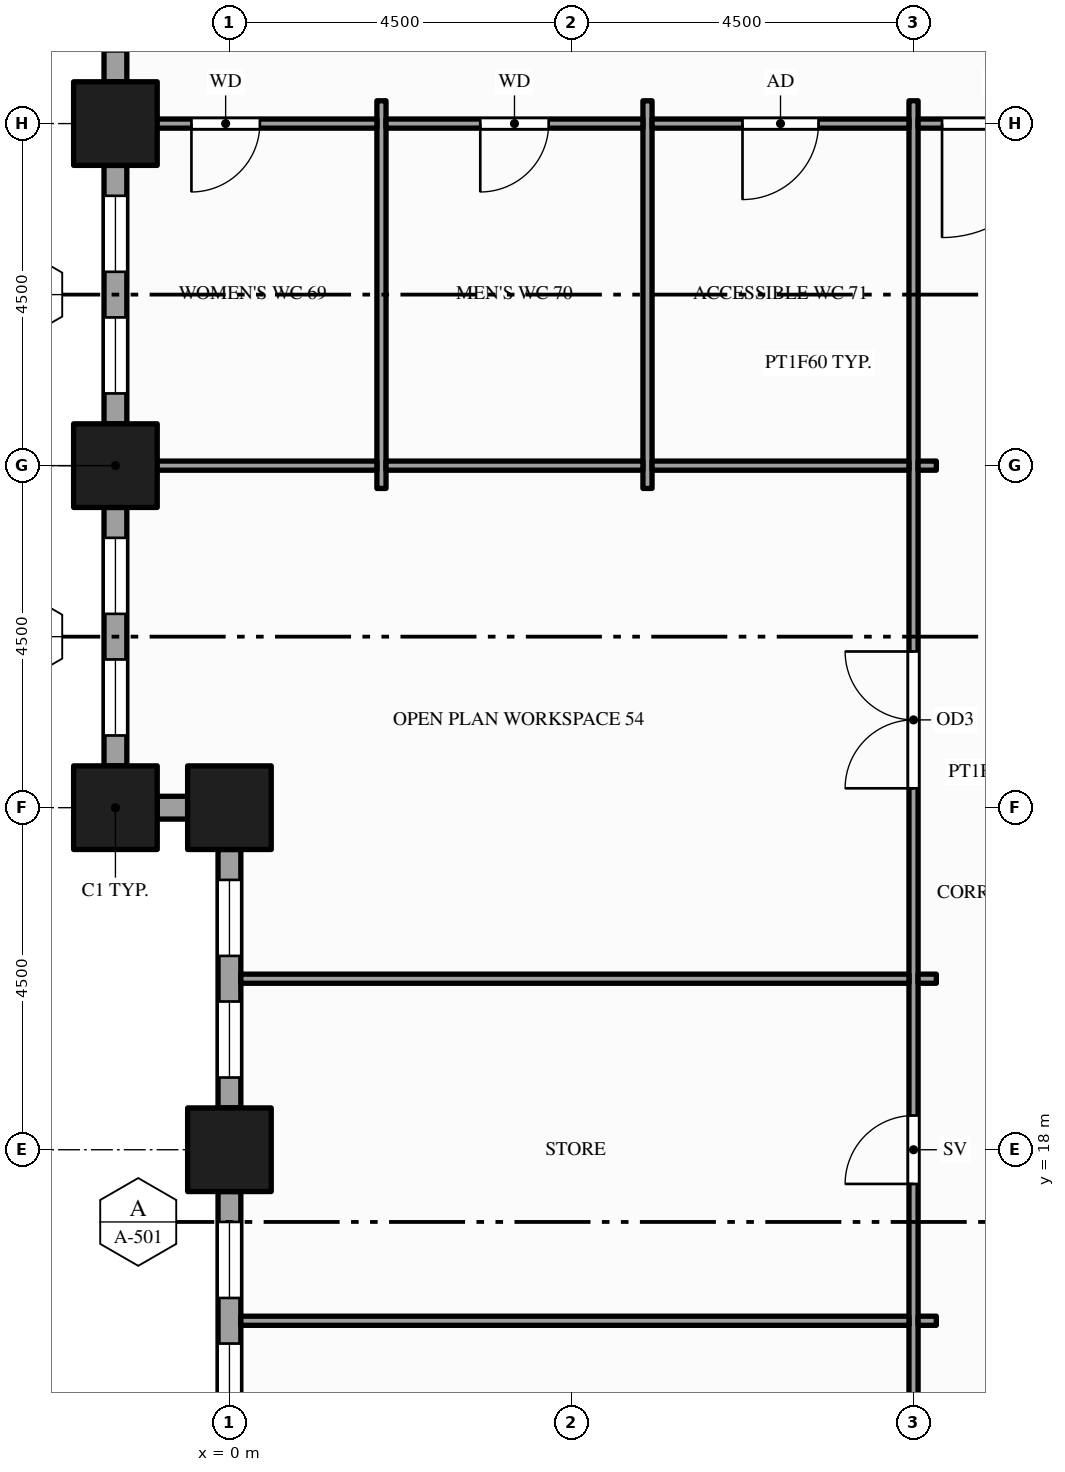
"""IFC4 building model, lengths in metres.
Left out: names, types, materials, properties, quantities, classifications, styles, units other than length and angle.
Written with IfcOpenShell. Run it as: python <this file> out.ifc"""

import sys

from ifc_helpers import new_model, si_unit, direction, frame, frame_2d, origin, origin_2d, place, context, subcontext, project, spatial, rectangle, hollow_rectangle, extrude, element, fill, save


model = new_model("IFC4")
c1 = context("Model", 3, precision=1e-05, world=origin(), true_north=direction((0.0, 1.0)))
c2 = subcontext(c1, "Body", "Model", "MODEL_VIEW")
j1 = project(units=[si_unit("LENGTHUNIT", "METRE"), si_unit("PLANEANGLEUNIT", "RADIAN")], contexts=[c1])
p1 = place(None, origin())
s1 = spatial("IfcSite", under=j1, at=p1, CompositionType="ELEMENT")
p2 = place(p1, origin())
s2 = spatial("IfcBuilding", under=s1, at=p2, CompositionType="ELEMENT")
p3 = place(p2, frame((0.0, 0.0, 29.0)))
s3 = spatial("IfcBuildingStorey", under=s2, at=p3, CompositionType="ELEMENT", Elevation=29.0)
for number, where, z_axis, x_axis in (
    (1, (-1.5, 22.5, -0.15), (0.0, 0.0, 1.0), (1.0, 0.0, 0.0)),
    (2, (-1.5, 27.0, -0.15), (0.0, 0.0, 1.0), (1.0, 0.0, 0.0)),
    (3, (-1.5, 31.5, -0.15), (0.0, 0.0, 1.0), (1.0, 0.0, 0.0)),
    (4, (0.0, 18.0, -0.15), (0.0, 0.0, 1.0), (1.0, 0.0, 0.0)),
    (5, (0.0, 22.5, -0.15), (0.0, 0.0, 1.0), (1.0, 0.0, 0.0)),
):
    element("IfcColumn", number, at=place(p3, frame(where, z_axis=z_axis, x_axis=x_axis)), inside=s3, PredefinedType="COLUMN", context=c2, shape_type="SweptSolid", body=[
        extrude(hollow_rectangle(XDim=1.1, YDim=1.1, WallThickness=0.06, at=origin_2d()), origin(), (0.0, 0.0, 1.0), 4.0),
    ])
p4 = place(p3, frame((-1.5, 35.45, 0.0), z_axis=(0.0, 0.0, 1.0), x_axis=(0.0, -1.0, 0.0)))
e6 = element("IfcWall", 6, at=p4, inside=s3, PredefinedType="STANDARD", context=c2, shape_type="SweptSolid", body=[
    extrude(rectangle(XDim=3.4, YDim=0.3, at=frame_2d((1.7, 0.0))), origin(), (0.0, 0.0, 1.0), 3.144),
])
p5 = place(p4, frame((0.4, 0.0, 0.9)))
e7 = element("IfcOpeningElement", 7, at=p5, cuts=e6, PredefinedType="OPENING", context=c2, shape_type="SweptSolid", body=[
    extrude(rectangle(XDim=1.0, YDim=2.0, at=frame_2d((0.5, 1.0))), frame((0.0, 0.16, 0.0), z_axis=(0.0, -1.0, 0.0), x_axis=(1.0, 0.0, 0.0)), (0.0, 0.0, 1.0), 0.32),
])
p6 = place(p4, frame((2.0, 0.0, 0.9)))
e8 = element("IfcOpeningElement", 8, at=p6, cuts=e6, PredefinedType="OPENING", context=c2, shape_type="SweptSolid", body=[
    extrude(rectangle(XDim=1.0, YDim=2.0, at=frame_2d((0.5, 1.0))), frame((0.0, 0.16, 0.0), z_axis=(0.0, -1.0, 0.0), x_axis=(1.0, 0.0, 0.0)), (0.0, 0.0, 1.0), 0.32),
])
p7 = place(p3, frame((-1.5, 30.95, 0.0), z_axis=(0.0, 0.0, 1.0), x_axis=(0.0, -1.0, 0.0)))
e9 = element("IfcWall", 9, at=p7, inside=s3, PredefinedType="STANDARD", context=c2, shape_type="SweptSolid", body=[
    extrude(rectangle(XDim=3.4, YDim=0.3, at=frame_2d((1.7, 0.0))), origin(), (0.0, 0.0, 1.0), 3.144),
])
p8 = place(p7, frame((0.4, 0.0, 0.9)))
e10 = element("IfcOpeningElement", 10, at=p8, cuts=e9, PredefinedType="OPENING", context=c2, shape_type="SweptSolid", body=[
    extrude(rectangle(XDim=1.0, YDim=2.0, at=frame_2d((0.5, 1.0))), frame((0.0, 0.16, 0.0), z_axis=(0.0, -1.0, 0.0), x_axis=(1.0, 0.0, 0.0)), (0.0, 0.0, 1.0), 0.32),
])
p9 = place(p7, frame((2.0, 0.0, 0.9)))
e11 = element("IfcOpeningElement", 11, at=p9, cuts=e9, PredefinedType="OPENING", context=c2, shape_type="SweptSolid", body=[
    extrude(rectangle(XDim=1.0, YDim=2.0, at=frame_2d((0.5, 1.0))), frame((0.0, 0.16, 0.0), z_axis=(0.0, -1.0, 0.0), x_axis=(1.0, 0.0, 0.0)), (0.0, 0.0, 1.0), 0.32),
])
p10 = place(p3, frame((-1.5, 26.45, 0.0), z_axis=(0.0, 0.0, 1.0), x_axis=(0.0, -1.0, 0.0)))
e12 = element("IfcWall", 12, at=p10, inside=s3, PredefinedType="STANDARD", context=c2, shape_type="SweptSolid", body=[
    extrude(rectangle(XDim=3.4, YDim=0.3, at=frame_2d((1.7, 0.0))), origin(), (0.0, 0.0, 1.0), 3.144),
])
p11 = place(p10, frame((0.4, 0.0, 0.9)))
e13 = element("IfcOpeningElement", 13, at=p11, cuts=e12, PredefinedType="OPENING", context=c2, shape_type="SweptSolid", body=[
    extrude(rectangle(XDim=1.0, YDim=2.0, at=frame_2d((0.5, 1.0))), frame((0.0, 0.16, 0.0), z_axis=(0.0, -1.0, 0.0), x_axis=(1.0, 0.0, 0.0)), (0.0, 0.0, 1.0), 0.32),
])
p12 = place(p10, frame((2.0, 0.0, 0.9)))
e14 = element("IfcOpeningElement", 14, at=p12, cuts=e12, PredefinedType="OPENING", context=c2, shape_type="SweptSolid", body=[
    extrude(rectangle(XDim=1.0, YDim=2.0, at=frame_2d((0.5, 1.0))), frame((0.0, 0.16, 0.0), z_axis=(0.0, -1.0, 0.0), x_axis=(1.0, 0.0, 0.0)), (0.0, 0.0, 1.0), 0.32),
])
p13 = place(p3, frame((-0.95, 22.5, 0.0), z_axis=(0.0, 0.0, 1.0), x_axis=(1.0, 0.0, 0.0)))
e15 = element("IfcWall", 15, at=p13, inside=s3, PredefinedType="STANDARD", context=c2, shape_type="SweptSolid", body=[
    extrude(rectangle(XDim=0.4, YDim=0.3, at=frame_2d((0.2, 0.0))), origin(), (0.0, 0.0, 1.0), 3.144),
])
p14 = place(p3, frame((0.0, 21.95, 0.0), z_axis=(0.0, 0.0, 1.0), x_axis=(0.0, -1.0, 0.0)))
e16 = element("IfcWall", 16, at=p14, inside=s3, PredefinedType="STANDARD", context=c2, shape_type="SweptSolid", body=[
    extrude(rectangle(XDim=3.4, YDim=0.3, at=frame_2d((1.7, 0.0))), origin(), (0.0, 0.0, 1.0), 3.144),
])
p15 = place(p14, frame((0.4, 0.0, 0.9)))
e17 = element("IfcOpeningElement", 17, at=p15, cuts=e16, PredefinedType="OPENING", context=c2, shape_type="SweptSolid", body=[
    extrude(rectangle(XDim=1.0, YDim=2.0, at=frame_2d((0.5, 1.0))), frame((0.0, 0.16, 0.0), z_axis=(0.0, -1.0, 0.0), x_axis=(1.0, 0.0, 0.0)), (0.0, 0.0, 1.0), 0.32),
])
p16 = place(p14, frame((2.0, 0.0, 0.9)))
e18 = element("IfcOpeningElement", 18, at=p16, cuts=e16, PredefinedType="OPENING", context=c2, shape_type="SweptSolid", body=[
    extrude(rectangle(XDim=1.0, YDim=2.0, at=frame_2d((0.5, 1.0))), frame((0.0, 0.16, 0.0), z_axis=(0.0, -1.0, 0.0), x_axis=(1.0, 0.0, 0.0)), (0.0, 0.0, 1.0), 0.32),
])
p17 = place(p3, frame((0.0, 17.45, 0.0), z_axis=(0.0, 0.0, 1.0), x_axis=(0.0, -1.0, 0.0)))
e19 = element("IfcWall", 19, at=p17, inside=s3, PredefinedType="STANDARD", context=c2, shape_type="SweptSolid", body=[
    extrude(rectangle(XDim=3.4, YDim=0.3, at=frame_2d((1.7, 0.0))), origin(), (0.0, 0.0, 1.0), 3.144),
])
p18 = place(p17, frame((0.4, 0.0, 0.9)))
e20 = element("IfcOpeningElement", 20, at=p18, cuts=e19, PredefinedType="OPENING", context=c2, shape_type="SweptSolid", body=[
    extrude(rectangle(XDim=1.0, YDim=2.0, at=frame_2d((0.5, 1.0))), frame((0.0, 0.16, 0.0), z_axis=(0.0, -1.0, 0.0), x_axis=(1.0, 0.0, 0.0)), (0.0, 0.0, 1.0), 0.32),
])
p19 = place(p17, frame((2.0, 0.0, 0.9)))
e21 = element("IfcOpeningElement", 21, at=p19, cuts=e19, PredefinedType="OPENING", context=c2, shape_type="SweptSolid", body=[
    extrude(rectangle(XDim=1.0, YDim=2.0, at=frame_2d((0.5, 1.0))), frame((0.0, 0.16, 0.0), z_axis=(0.0, -1.0, 0.0), x_axis=(1.0, 0.0, 0.0)), (0.0, 0.0, 1.0), 0.32),
])
for number, where, z_axis, x_axis in (
    (22, (2.0, 26.7, 0.0), (0.0, 0.0, 1.0), (0.0, 1.0, 0.0)),
    (23, (5.5, 26.7, 0.0), (0.0, 0.0, 1.0), (0.0, 1.0, 0.0)),
):
    element("IfcWall", number, at=place(p3, frame(where, z_axis=z_axis, x_axis=x_axis)), inside=s3, PredefinedType="PARTITIONING", context=c2, shape_type="SweptSolid", body=[
        extrude(rectangle(XDim=5.1, YDim=0.12, at=frame_2d((2.55, 0.0))), origin(), (0.0, 0.0, 1.0), 3.85),
    ])
p20 = place(p3, frame((9.0, 10.95, 0.0), z_axis=(0.0, 0.0, 1.0), x_axis=(0.0, 1.0, 0.0)))
e24 = element("IfcWall", 24, at=p20, inside=s3, PredefinedType="PARTITIONING", context=c2, shape_type="SweptSolid", body=[
    extrude(rectangle(XDim=20.85, YDim=0.12, at=frame_2d((10.425, 0.0))), origin(), (0.0, 0.0, 1.0), 2.6),
])
p21 = place(p20, frame((2.05, 0.0, 0.0)))
e25 = element("IfcOpeningElement", 25, at=p21, cuts=e24, PredefinedType="OPENING", context=c2, shape_type="SweptSolid", body=[
    extrude(rectangle(XDim=1.0, YDim=2.1, at=frame_2d((0.5, 1.05))), frame((0.0, 0.07, 0.0), z_axis=(0.0, -1.0, 0.0), x_axis=(1.0, 0.0, 0.0)), (0.0, 0.0, 1.0), 0.14),
])
p22 = place(p20, frame((6.6, 0.0, 0.0)))
e26 = element("IfcOpeningElement", 26, at=p22, cuts=e24, PredefinedType="OPENING", context=c2, shape_type="SweptSolid", body=[
    extrude(rectangle(XDim=0.9, YDim=2.1, at=frame_2d((0.45, 1.05))), frame((0.0, 0.07, 0.0), z_axis=(0.0, -1.0, 0.0), x_axis=(1.0, 0.0, 0.0)), (0.0, 0.0, 1.0), 0.14),
])
p23 = place(p20, frame((11.805, 0.0, 0.0)))
e27 = element("IfcOpeningElement", 27, at=p23, cuts=e24, PredefinedType="OPENING", context=c2, shape_type="SweptSolid", body=[
    extrude(rectangle(XDim=1.8, YDim=2.1, at=frame_2d((0.9, 1.05))), frame((0.0, 0.07, 0.0), z_axis=(0.0, -1.0, 0.0), x_axis=(1.0, 0.0, 0.0)), (0.0, 0.0, 1.0), 0.14),
])
p24 = place(p3, frame((0.15, 15.75, 0.0), z_axis=(0.0, 0.0, 1.0), x_axis=(1.0, 0.0, 0.0)))
e28 = element("IfcWall", 28, at=p24, inside=s3, PredefinedType="PARTITIONING", context=c2, shape_type="SweptSolid", body=[
    extrude(rectangle(XDim=8.79, YDim=0.12, at=frame_2d((4.395, 0.0))), origin(), (0.0, 0.0, 1.0), 2.938),
])
p25 = place(p3, frame((9.06, 15.75, 0.0), z_axis=(0.0, 0.0, 1.0), x_axis=(1.0, 0.0, 0.0)))
e29 = element("IfcWall", 29, at=p25, inside=s3, PredefinedType="PARTITIONING", context=c2, shape_type="SweptSolid", body=[
    extrude(rectangle(XDim=0.24, YDim=0.12, at=frame_2d((0.12, 0.0))), origin(), (0.0, 0.0, 1.0), 2.938),
])
p26 = place(p3, frame((0.15, 20.25, 0.0), z_axis=(0.0, 0.0, 1.0), x_axis=(1.0, 0.0, 0.0)))
e30 = element("IfcWall", 30, at=p26, inside=s3, PredefinedType="PARTITIONING", context=c2, shape_type="SweptSolid", body=[
    extrude(rectangle(XDim=8.79, YDim=0.12, at=frame_2d((4.395, 0.0))), origin(), (0.0, 0.0, 1.0), 2.938),
])
p27 = place(p3, frame((9.06, 20.25, 0.0), z_axis=(0.0, 0.0, 1.0), x_axis=(1.0, 0.0, 0.0)))
e31 = element("IfcWall", 31, at=p27, inside=s3, PredefinedType="PARTITIONING", context=c2, shape_type="SweptSolid", body=[
    extrude(rectangle(XDim=0.24, YDim=0.12, at=frame_2d((0.12, 0.0))), origin(), (0.0, 0.0, 1.0), 2.938),
])
p28 = place(p3, frame((-1.35, 27.0, 0.0), z_axis=(0.0, 0.0, 1.0), x_axis=(1.0, 0.0, 0.0)))
e32 = element("IfcWall", 32, at=p28, inside=s3, PredefinedType="PARTITIONING", context=c2, shape_type="SweptSolid", body=[
    extrude(rectangle(XDim=3.29, YDim=0.12, at=frame_2d((1.645, 0.0))), origin(), (0.0, 0.0, 1.0), 2.938),
])
for number, where, z_axis, x_axis in (
    (33, (2.06, 27.0, 0.0), (0.0, 0.0, 1.0), (1.0, 0.0, 0.0)),
    (34, (5.56, 27.0, 0.0), (0.0, 0.0, 1.0), (1.0, 0.0, 0.0)),
):
    element("IfcWall", number, at=place(p3, frame(where, z_axis=z_axis, x_axis=x_axis)), inside=s3, PredefinedType="PARTITIONING", context=c2, shape_type="SweptSolid", body=[
        extrude(rectangle(XDim=3.38, YDim=0.12, at=frame_2d((1.69, 0.0))), origin(), (0.0, 0.0, 1.0), 2.938),
    ])
p29 = place(p3, frame((9.06, 27.0, 0.0), z_axis=(0.0, 0.0, 1.0), x_axis=(1.0, 0.0, 0.0)))
e35 = element("IfcWall", 35, at=p29, inside=s3, PredefinedType="PARTITIONING", context=c2, shape_type="SweptSolid", body=[
    extrude(rectangle(XDim=0.24, YDim=0.12, at=frame_2d((0.12, 0.0))), origin(), (0.0, 0.0, 1.0), 2.938),
])
p30 = place(p3, frame((-1.35, 31.5, 0.0), z_axis=(0.0, 0.0, 1.0), x_axis=(1.0, 0.0, 0.0)))
e36 = element("IfcWall", 36, at=p30, inside=s3, PredefinedType="PARTITIONING", context=c2, shape_type="SweptSolid", body=[
    extrude(rectangle(XDim=3.29, YDim=0.12, at=frame_2d((1.645, 0.0))), origin(), (0.0, 0.0, 1.0), 2.938),
])
p31 = place(p30, frame((0.85, 0.0, 0.0)))
e37 = element("IfcOpeningElement", 37, at=p31, cuts=e36, PredefinedType="OPENING", context=c2, shape_type="SweptSolid", body=[
    extrude(rectangle(XDim=0.9, YDim=2.1, at=frame_2d((0.45, 1.05))), frame((0.0, 0.07, 0.0), z_axis=(0.0, -1.0, 0.0), x_axis=(1.0, 0.0, 0.0)), (0.0, 0.0, 1.0), 0.14),
])
p32 = place(p3, frame((2.06, 31.5, 0.0), z_axis=(0.0, 0.0, 1.0), x_axis=(1.0, 0.0, 0.0)))
e38 = element("IfcWall", 38, at=p32, inside=s3, PredefinedType="PARTITIONING", context=c2, shape_type="SweptSolid", body=[
    extrude(rectangle(XDim=3.38, YDim=0.12, at=frame_2d((1.69, 0.0))), origin(), (0.0, 0.0, 1.0), 2.938),
])
p33 = place(p32, frame((1.24, 0.0, 0.0)))
e39 = element("IfcOpeningElement", 39, at=p33, cuts=e38, PredefinedType="OPENING", context=c2, shape_type="SweptSolid", body=[
    extrude(rectangle(XDim=0.9, YDim=2.1, at=frame_2d((0.45, 1.05))), frame((0.0, 0.07, 0.0), z_axis=(0.0, -1.0, 0.0), x_axis=(1.0, 0.0, 0.0)), (0.0, 0.0, 1.0), 0.14),
])
p34 = place(p3, frame((5.56, 31.5, 0.0), z_axis=(0.0, 0.0, 1.0), x_axis=(1.0, 0.0, 0.0)))
e40 = element("IfcWall", 40, at=p34, inside=s3, PredefinedType="PARTITIONING", context=c2, shape_type="SweptSolid", body=[
    extrude(rectangle(XDim=3.38, YDim=0.12, at=frame_2d((1.69, 0.0))), origin(), (0.0, 0.0, 1.0), 2.938),
])
p35 = place(p34, frame((1.19, 0.0, 0.0)))
e41 = element("IfcOpeningElement", 41, at=p35, cuts=e40, PredefinedType="OPENING", context=c2, shape_type="SweptSolid", body=[
    extrude(rectangle(XDim=1.0, YDim=2.1, at=frame_2d((0.5, 1.05))), frame((0.0, 0.07, 0.0), z_axis=(0.0, -1.0, 0.0), x_axis=(1.0, 0.0, 0.0)), (0.0, 0.0, 1.0), 0.14),
])
p36 = place(p3, frame((9.06, 31.5, 0.0), z_axis=(0.0, 0.0, 1.0), x_axis=(1.0, 0.0, 0.0)))
e42 = element("IfcWall", 42, at=p36, inside=s3, PredefinedType="PARTITIONING", context=c2, shape_type="SweptSolid", body=[
    extrude(rectangle(XDim=2.13, YDim=0.12, at=frame_2d((1.065, 0.0))), origin(), (0.0, 0.0, 1.0), 2.938),
])
p37 = place(p36, frame((0.315, 0.0, 0.0)))
e43 = element("IfcOpeningElement", 43, at=p37, cuts=e42, PredefinedType="OPENING", context=c2, shape_type="SweptSolid", body=[
    extrude(rectangle(XDim=1.5, YDim=2.1, at=frame_2d((0.75, 1.05))), frame((0.0, 0.07, 0.0), z_axis=(0.0, -1.0, 0.0), x_axis=(1.0, 0.0, 0.0)), (0.0, 0.0, 1.0), 0.14),
])
p38 = place(p8, origin())
e44 = element("IfcWindow", 44, at=p38, inside=s3, PartitioningType="SINGLE_PANEL", PredefinedType="WINDOW", context=c2, shape_type="SweptSolid", body=[
    extrude(rectangle(XDim=1.0, YDim=2.0, at=frame_2d((0.5, 1.0))), frame((0.0, 0.03, 0.0), z_axis=(0.0, -1.0, 0.0), x_axis=(1.0, 0.0, 0.0)), (0.0, 0.0, 1.0), 0.06),
])
fill(e10, e44)
p39 = place(p9, origin())
e45 = element("IfcWindow", 45, at=p39, inside=s3, PartitioningType="SINGLE_PANEL", PredefinedType="WINDOW", context=c2, shape_type="SweptSolid", body=[
    extrude(rectangle(XDim=1.0, YDim=2.0, at=frame_2d((0.5, 1.0))), frame((0.0, 0.03, 0.0), z_axis=(0.0, -1.0, 0.0), x_axis=(1.0, 0.0, 0.0)), (0.0, 0.0, 1.0), 0.06),
])
fill(e11, e45)
p40 = place(p11, origin())
e46 = element("IfcWindow", 46, at=p40, inside=s3, PartitioningType="SINGLE_PANEL", PredefinedType="WINDOW", context=c2, shape_type="SweptSolid", body=[
    extrude(rectangle(XDim=1.0, YDim=2.0, at=frame_2d((0.5, 1.0))), frame((0.0, 0.03, 0.0), z_axis=(0.0, -1.0, 0.0), x_axis=(1.0, 0.0, 0.0)), (0.0, 0.0, 1.0), 0.06),
])
fill(e13, e46)
p41 = place(p12, origin())
e47 = element("IfcWindow", 47, at=p41, inside=s3, PartitioningType="SINGLE_PANEL", PredefinedType="WINDOW", context=c2, shape_type="SweptSolid", body=[
    extrude(rectangle(XDim=1.0, YDim=2.0, at=frame_2d((0.5, 1.0))), frame((0.0, 0.03, 0.0), z_axis=(0.0, -1.0, 0.0), x_axis=(1.0, 0.0, 0.0)), (0.0, 0.0, 1.0), 0.06),
])
fill(e14, e47)
p42 = place(p15, origin())
e48 = element("IfcWindow", 48, at=p42, inside=s3, PartitioningType="SINGLE_PANEL", PredefinedType="WINDOW", context=c2, shape_type="SweptSolid", body=[
    extrude(rectangle(XDim=1.0, YDim=2.0, at=frame_2d((0.5, 1.0))), frame((0.0, 0.03, 0.0), z_axis=(0.0, -1.0, 0.0), x_axis=(1.0, 0.0, 0.0)), (0.0, 0.0, 1.0), 0.06),
])
fill(e17, e48)
p43 = place(p16, origin())
e49 = element("IfcWindow", 49, at=p43, inside=s3, PartitioningType="SINGLE_PANEL", PredefinedType="WINDOW", context=c2, shape_type="SweptSolid", body=[
    extrude(rectangle(XDim=1.0, YDim=2.0, at=frame_2d((0.5, 1.0))), frame((0.0, 0.03, 0.0), z_axis=(0.0, -1.0, 0.0), x_axis=(1.0, 0.0, 0.0)), (0.0, 0.0, 1.0), 0.06),
])
fill(e18, e49)
p44 = place(p18, origin())
e50 = element("IfcWindow", 50, at=p44, inside=s3, PartitioningType="SINGLE_PANEL", PredefinedType="WINDOW", context=c2, shape_type="SweptSolid", body=[
    extrude(rectangle(XDim=1.0, YDim=2.0, at=frame_2d((0.5, 1.0))), frame((0.0, 0.03, 0.0), z_axis=(0.0, -1.0, 0.0), x_axis=(1.0, 0.0, 0.0)), (0.0, 0.0, 1.0), 0.06),
])
fill(e20, e50)
p45 = place(p19, origin())
e51 = element("IfcWindow", 51, at=p45, inside=s3, PartitioningType="SINGLE_PANEL", PredefinedType="WINDOW", context=c2, shape_type="SweptSolid", body=[
    extrude(rectangle(XDim=1.0, YDim=2.0, at=frame_2d((0.5, 1.0))), frame((0.0, 0.03, 0.0), z_axis=(0.0, -1.0, 0.0), x_axis=(1.0, 0.0, 0.0)), (0.0, 0.0, 1.0), 0.06),
])
fill(e21, e51)
p46 = place(p37, origin())
e52 = element("IfcDoor", 52, at=p46, inside=s3, OperationType="SINGLE_SWING_LEFT", PredefinedType="DOOR", context=c2, shape_type="SweptSolid", body=[
    extrude(rectangle(XDim=1.5, YDim=2.1, at=frame_2d((0.75, 1.05))), frame((0.0, 0.025, 0.0), z_axis=(0.0, -1.0, 0.0), x_axis=(1.0, 0.0, 0.0)), (0.0, 0.0, 1.0), 0.05),
])
fill(e43, e52)
p47 = place(p22, origin())
e53 = element("IfcDoor", 53, at=p47, inside=s3, OperationType="SINGLE_SWING_LEFT", PredefinedType="DOOR", context=c2, shape_type="SweptSolid", body=[
    extrude(rectangle(XDim=0.9, YDim=2.1, at=frame_2d((0.45, 1.05))), frame((0.0, 0.025, 0.0), z_axis=(0.0, -1.0, 0.0), x_axis=(1.0, 0.0, 0.0)), (0.0, 0.0, 1.0), 0.05),
])
fill(e26, e53)
p48 = place(p23, origin())
e54 = element("IfcDoor", 54, at=p48, inside=s3, OperationType="DOUBLE_DOOR_SINGLE_SWING", PredefinedType="DOOR", context=c2, shape_type="SweptSolid", body=[
    extrude(rectangle(XDim=1.8, YDim=2.1, at=frame_2d((0.9, 1.05))), frame((0.0, 0.025, 0.0), z_axis=(0.0, -1.0, 0.0), x_axis=(1.0, 0.0, 0.0)), (0.0, 0.0, 1.0), 0.05),
])
fill(e27, e54)
p49 = place(p31, origin())
e55 = element("IfcDoor", 55, at=p49, inside=s3, OperationType="SINGLE_SWING_LEFT", PredefinedType="DOOR", context=c2, shape_type="SweptSolid", body=[
    extrude(rectangle(XDim=0.9, YDim=2.1, at=frame_2d((0.45, 1.05))), frame((0.0, 0.025, 0.0), z_axis=(0.0, -1.0, 0.0), x_axis=(1.0, 0.0, 0.0)), (0.0, 0.0, 1.0), 0.05),
])
fill(e37, e55)
p50 = place(p33, origin())
e56 = element("IfcDoor", 56, at=p50, inside=s3, OperationType="SINGLE_SWING_LEFT", PredefinedType="DOOR", context=c2, shape_type="SweptSolid", body=[
    extrude(rectangle(XDim=0.9, YDim=2.1, at=frame_2d((0.45, 1.05))), frame((0.0, 0.025, 0.0), z_axis=(0.0, -1.0, 0.0), x_axis=(1.0, 0.0, 0.0)), (0.0, 0.0, 1.0), 0.05),
])
fill(e39, e56)
p51 = place(p35, origin())
e57 = element("IfcDoor", 57, at=p51, inside=s3, OperationType="SINGLE_SWING_LEFT", PredefinedType="DOOR", context=c2, shape_type="SweptSolid", body=[
    extrude(rectangle(XDim=1.0, YDim=2.1, at=frame_2d((0.5, 1.05))), frame((0.0, 0.025, 0.0), z_axis=(0.0, -1.0, 0.0), x_axis=(1.0, 0.0, 0.0)), (0.0, 0.0, 1.0), 0.05),
])
fill(e41, e57)
save(model, sys.argv[1])
